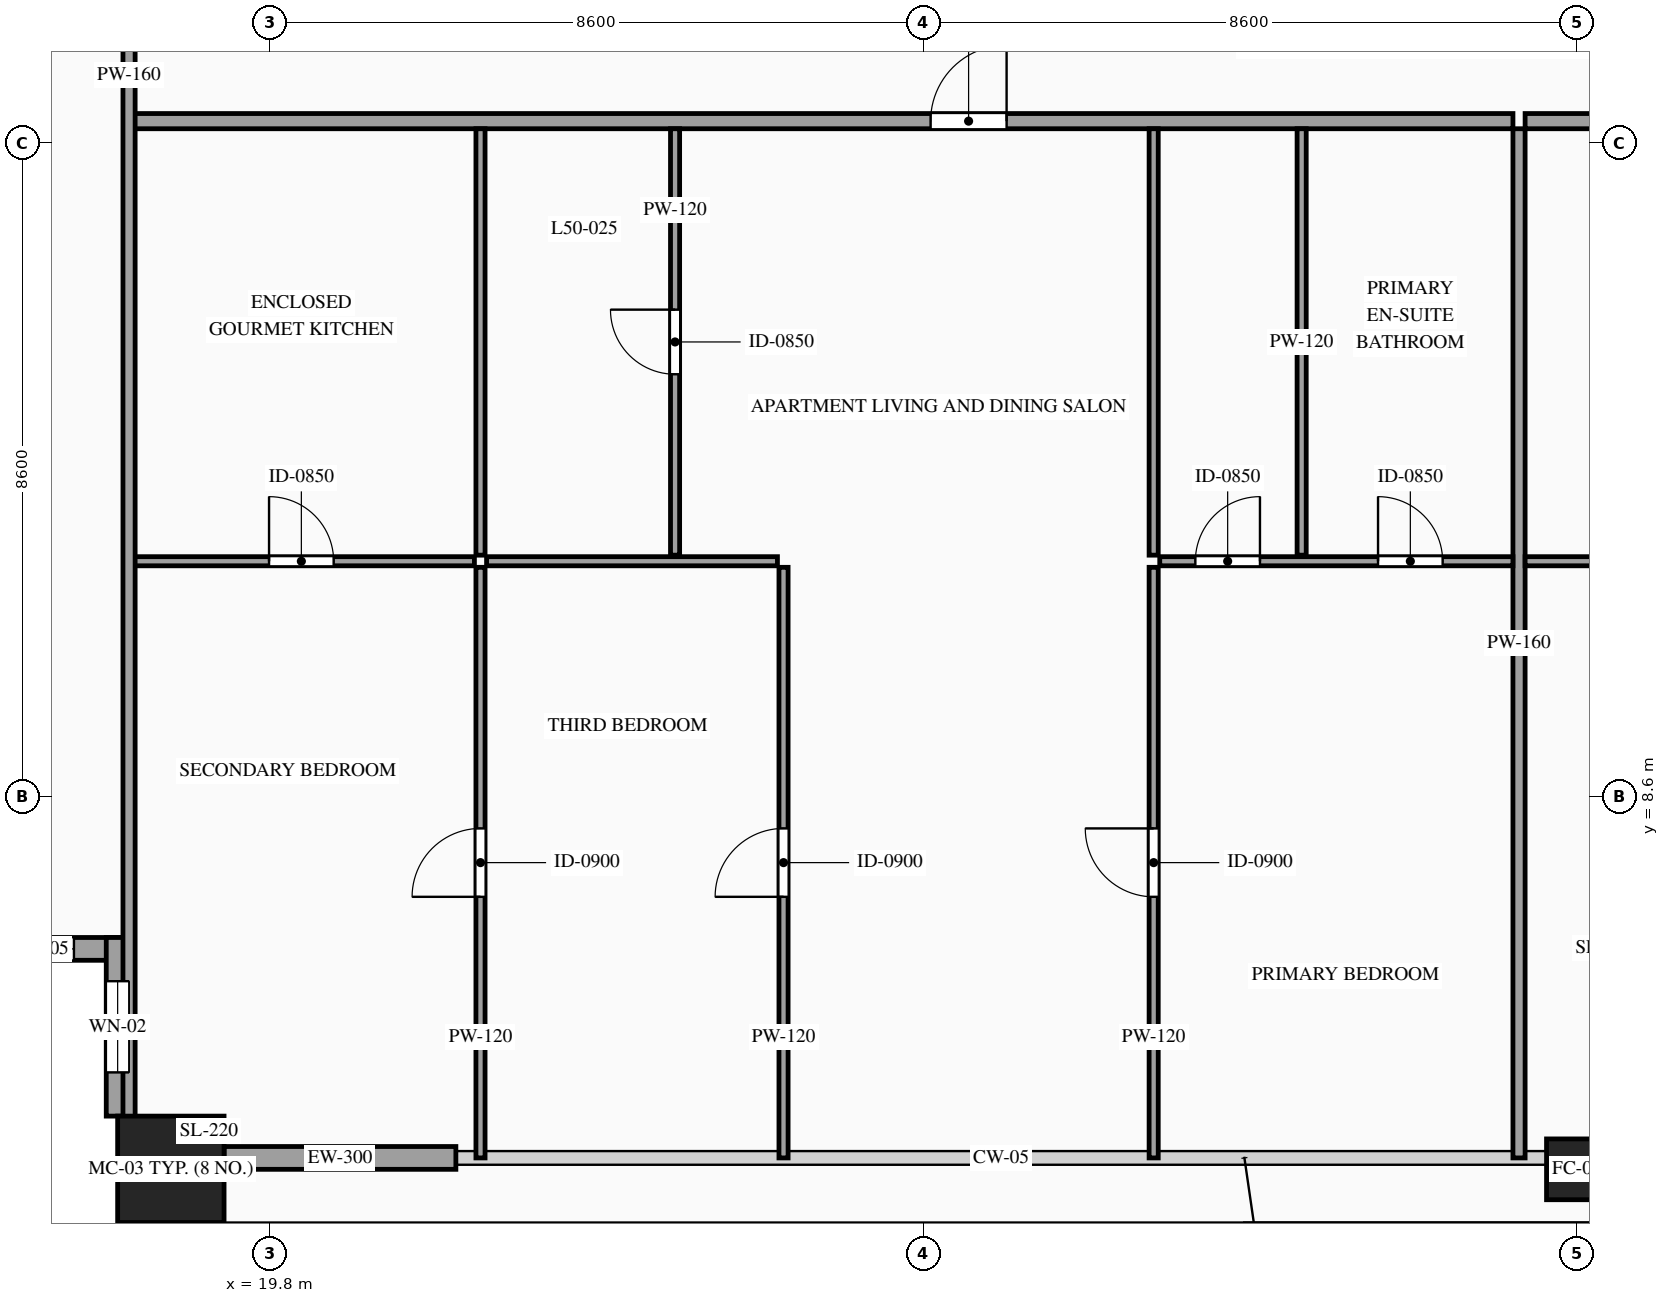
"""IFC4 building model, lengths in metres.
Left out: names, types, materials, properties, quantities, classifications, styles, units other than length and angle.
Written with IfcOpenShell. Run it as: python <this file> out.ifc"""

import sys

from ifc_helpers import new_model, si_unit, direction, frame, frame_2d, origin, origin_2d, place, context, subcontext, project, spatial, rectangle, hollow_rectangle, extrude, source, transform, mapped, element, fill, save


model = new_model("IFC4")
c1 = context("Model", 3, precision=1e-05, world=origin(), true_north=direction((0.0, 1.0)))
c2 = subcontext(c1, "Body", "Model", "MODEL_VIEW")
j1 = project(units=[si_unit("LENGTHUNIT", "METRE"), si_unit("PLANEANGLEUNIT", "RADIAN")], contexts=[c1])
p1 = place(None, origin())
s1 = spatial("IfcSite", under=j1, at=p1, CompositionType="ELEMENT")
p2 = place(p1, origin())
s2 = spatial("IfcBuilding", under=s1, at=p2, CompositionType="ELEMENT")
p3 = place(p2, frame((0.0, 0.0, 191.5)))
s3 = spatial("IfcBuildingStorey", under=s2, at=p3, CompositionType="ELEMENT", Elevation=191.5)
m1 = source(origin(), c2, "Body", "SweptSolid", [
    extrude(hollow_rectangle(XDim=1.4, YDim=1.4, WallThickness=0.06, at=origin_2d()), origin(), (0.0, 0.0, 1.0), 3.5),
])
p4 = place(p3, frame((18.5, 3.7, 0.0), z_axis=(0.0, 0.0, 1.0), x_axis=(1.0, 0.0, 0.0)))
e1 = element("IfcColumn", 1, at=p4, inside=s3, PredefinedType="COLUMN", context=c2, shape_type="MappedRepresentation", body=[
    mapped(m1, transform((0.0, 0.0, 0.0), scale=1.0)),
])
m2 = source(origin(), c2, "Body", "SweptSolid", [
    extrude(hollow_rectangle(XDim=0.8, YDim=0.8, WallThickness=0.036, at=origin_2d()), origin(), (0.0, 0.0, 1.0), 3.5),
])
p5 = place(p3, frame((37.0, 3.7, 0.0), z_axis=(0.0, 0.0, 1.0), x_axis=(1.0, 0.0, 0.0)))
e2 = element("IfcColumn", 2, at=p5, inside=s3, PredefinedType="COLUMN", context=c2, shape_type="MappedRepresentation", body=[
    mapped(m2, transform((0.0, 0.0, 0.0), scale=1.0)),
])
p6 = place(p3, frame((15.6, 6.6, 0.0), z_axis=(0.0, 0.0, 1.0), x_axis=(1.0, 0.0, 0.0)))
e3 = element("IfcWall", 3, at=p6, inside=s3, PredefinedType="SOLIDWALL", context=c2, shape_type="SweptSolid", body=[
    extrude(rectangle(XDim=2.35, YDim=0.3, at=frame_2d((1.175, 0.0))), origin(), (0.0, 0.0, 1.0), 3.28),
])
p7 = place(p6, frame((0.725, 0.0, 0.85)))
e4 = element("IfcOpeningElement", 4, at=p7, cuts=e3, PredefinedType="OPENING", context=c2, shape_type="SweptSolid", body=[
    extrude(rectangle(XDim=0.9, YDim=1.5, at=frame_2d((0.45, 0.75))), frame((0.0, 0.165, 0.0), z_axis=(0.0, -1.0, 0.0), x_axis=(1.0, 0.0, 0.0)), (0.0, 0.0, 1.0), 0.33),
])
p8 = place(p3, frame((17.8, 6.75, 0.0), z_axis=(0.0, 0.0, 1.0), x_axis=(0.0, -1.0, 0.0)))
e5 = element("IfcWall", 5, at=p8, inside=s3, PredefinedType="SOLIDWALL", context=c2, shape_type="SweptSolid", body=[
    extrude(rectangle(XDim=2.35, YDim=0.3, at=frame_2d((1.175, 0.0))), origin(), (0.0, 0.0, 1.0), 3.28),
])
p9 = place(p8, frame((0.575, 0.0, 0.85)))
e6 = element("IfcOpeningElement", 6, at=p9, cuts=e5, PredefinedType="OPENING", context=c2, shape_type="SweptSolid", body=[
    extrude(rectangle(XDim=1.2, YDim=2.1, at=frame_2d((0.6, 1.05))), frame((0.0, 0.165, 0.0), z_axis=(0.0, -1.0, 0.0), x_axis=(1.0, 0.0, 0.0)), (0.0, 0.0, 1.0), 0.33),
])
m3 = source(origin(), c2, "Body", "SweptSolid", [
    extrude(rectangle(XDim=3.05, YDim=0.3, at=frame_2d((1.525, 0.0))), origin(), (0.0, 0.0, 1.0), 2.835),
])
p10 = place(p3, frame((19.2, 3.85, 0.0), z_axis=(0.0, 0.0, 1.0), x_axis=(1.0, 0.0, 0.0)))
e7 = element("IfcWall", 7, at=p10, inside=s3, PredefinedType="SOLIDWALL", context=c2, shape_type="MappedRepresentation", body=[
    mapped(m3, transform((0.0, 0.0, 0.0), scale=1.0)),
])
p11 = place(p3, frame((17.94, 17.49, 0.0), z_axis=(0.0, 0.0, 1.0), x_axis=(1.0, 0.0, 0.0)))
e8 = element("IfcWall", 8, at=p11, inside=s3, PredefinedType="PARTITIONING", context=c2, shape_type="SweptSolid", body=[
    extrude(rectangle(XDim=18.218, YDim=0.2, at=frame_2d((9.109, 0.0))), origin(), (0.0, 0.0, 1.0), 3.28),
])
p12 = place(p11, frame((10.556, 0.0, 0.0)))
e9 = element("IfcOpeningElement", 9, at=p12, cuts=e8, PredefinedType="OPENING", context=c2, shape_type="SweptSolid", body=[
    extrude(rectangle(XDim=1.0, YDim=2.2, at=frame_2d((0.5, 1.1))), frame((0.0, 0.115, 0.0), z_axis=(0.0, -1.0, 0.0), x_axis=(1.0, 0.0, 0.0)), (0.0, 0.0, 1.0), 0.23),
])
m4 = source(origin(), c2, "Body", "SweptSolid", [
    extrude(rectangle(XDim=13.54, YDim=0.16, at=frame_2d((6.77, 0.0))), origin(), (0.0, 0.0, 1.0), 3.28),
])
p13 = place(p3, frame((36.238, 3.85, 0.0), z_axis=(0.0, 0.0, 1.0), x_axis=(0.0, 1.0, 0.0)))
e10 = element("IfcWall", 10, at=p13, inside=s3, PredefinedType="PARTITIONING", context=c2, shape_type="MappedRepresentation", body=[
    mapped(m4, transform((0.0, 0.0, 0.0), scale=1.0)),
])
p14 = place(p3, frame((17.94, 11.7, 0.0), z_axis=(0.0, 0.0, 1.0), x_axis=(1.0, 0.0, 0.0)))
e11 = element("IfcWall", 11, at=p14, inside=s3, PredefinedType="PARTITIONING", context=c2, shape_type="SweptSolid", body=[
    extrude(rectangle(XDim=4.554, YDim=0.12, at=frame_2d((2.277, 0.0))), origin(), (0.0, 0.0, 1.0), 3.28),
])
p15 = place(p14, frame((1.852, 0.0, 0.0)))
e12 = element("IfcOpeningElement", 12, at=p15, cuts=e11, PredefinedType="OPENING", context=c2, shape_type="SweptSolid", body=[
    extrude(rectangle(XDim=0.85, YDim=2.1, at=frame_2d((0.425, 1.05))), frame((0.0, 0.075, 0.0), z_axis=(0.0, -1.0, 0.0), x_axis=(1.0, 0.0, 0.0)), (0.0, 0.0, 1.0), 0.15),
])
m5 = source(origin(), c2, "Body", "SweptSolid", [
    extrude(rectangle(XDim=5.61, YDim=0.12, at=frame_2d((2.805, 0.0))), origin(), (0.0, 0.0, 1.0), 3.28),
])
p16 = place(p3, frame((22.574, 11.78, 0.0), z_axis=(0.0, 0.0, 1.0), x_axis=(0.0, 1.0, 0.0)))
e13 = element("IfcWall", 13, at=p16, inside=s3, PredefinedType="PARTITIONING", context=c2, shape_type="MappedRepresentation", body=[
    mapped(m5, transform((0.0, 0.0, 0.0), scale=1.0)),
])
p17 = place(p3, frame((25.134, 11.78, 0.0), z_axis=(0.0, 0.0, 1.0), x_axis=(0.0, 1.0, 0.0)))
e14 = element("IfcWall", 14, at=p17, inside=s3, PredefinedType="PARTITIONING", context=c2, shape_type="SweptSolid", body=[
    extrude(rectangle(XDim=5.61, YDim=0.12, at=frame_2d((2.805, 0.0))), origin(), (0.0, 0.0, 1.0), 3.28),
])
p18 = place(p17, frame((2.38, 0.0, 0.0)))
e15 = element("IfcOpeningElement", 15, at=p18, cuts=e14, PredefinedType="OPENING", context=c2, shape_type="SweptSolid", body=[
    extrude(rectangle(XDim=0.85, YDim=2.1, at=frame_2d((0.425, 1.05))), frame((0.0, 0.075, 0.0), z_axis=(0.0, -1.0, 0.0), x_axis=(1.0, 0.0, 0.0)), (0.0, 0.0, 1.0), 0.15),
])
for number, where, z_axis, x_axis in (
    (16, (33.378, 11.78, 0.0), (0.0, 0.0, 1.0), (0.0, 1.0, 0.0)),
    (17, (31.431, 11.78, 0.0), (0.0, 0.0, 1.0), (0.0, 1.0, 0.0)),
):
    element("IfcWall", number, at=place(p3, frame(where, z_axis=z_axis, x_axis=x_axis)), inside=s3, PredefinedType="PARTITIONING", context=c2, shape_type="MappedRepresentation", body=[
        mapped(m5, transform((0.0, 0.0, 0.0), scale=1.0)),
    ])
p19 = place(p3, frame((22.574, 3.85, 0.0), z_axis=(0.0, 0.0, 1.0), x_axis=(0.0, 1.0, 0.0)))
e18 = element("IfcWall", 18, at=p19, inside=s3, PredefinedType="PARTITIONING", context=c2, shape_type="SweptSolid", body=[
    extrude(rectangle(XDim=7.77, YDim=0.12, at=frame_2d((3.885, 0.0))), origin(), (0.0, 0.0, 1.0), 3.28),
])
p20 = place(p19, frame((3.435, 0.0, 0.0)))
e19 = element("IfcOpeningElement", 19, at=p20, cuts=e18, PredefinedType="OPENING", context=c2, shape_type="SweptSolid", body=[
    extrude(rectangle(XDim=0.9, YDim=2.15, at=frame_2d((0.45, 1.075))), frame((0.0, 0.075, 0.0), z_axis=(0.0, -1.0, 0.0), x_axis=(1.0, 0.0, 0.0)), (0.0, 0.0, 1.0), 0.15),
])
p21 = place(p3, frame((31.511, 11.7, 0.0), z_axis=(0.0, 0.0, 1.0), x_axis=(1.0, 0.0, 0.0)))
e20 = element("IfcWall", 20, at=p21, inside=s3, PredefinedType="PARTITIONING", context=c2, shape_type="SweptSolid", body=[
    extrude(rectangle(XDim=4.647, YDim=0.12, at=frame_2d((2.323, 0.0))), origin(), (0.0, 0.0, 1.0), 2.875),
])
p22 = place(p21, frame((2.872, 0.0, 0.0)))
e21 = element("IfcOpeningElement", 21, at=p22, cuts=e20, PredefinedType="OPENING", context=c2, shape_type="SweptSolid", body=[
    extrude(rectangle(XDim=0.85, YDim=2.1, at=frame_2d((0.425, 1.05))), frame((0.0, 0.075, 0.0), z_axis=(0.0, -1.0, 0.0), x_axis=(1.0, 0.0, 0.0)), (0.0, 0.0, 1.0), 0.15),
])
p23 = place(p21, frame((0.469, 0.0, 0.0)))
e22 = element("IfcOpeningElement", 22, at=p23, cuts=e20, PredefinedType="OPENING", context=c2, shape_type="SweptSolid", body=[
    extrude(rectangle(XDim=0.85, YDim=2.1, at=frame_2d((0.425, 1.05))), frame((0.0, 0.075, 0.0), z_axis=(0.0, -1.0, 0.0), x_axis=(1.0, 0.0, 0.0)), (0.0, 0.0, 1.0), 0.15),
])
p24 = place(p3, frame((31.431, 3.85, 0.0), z_axis=(0.0, 0.0, 1.0), x_axis=(0.0, 1.0, 0.0)))
e23 = element("IfcWall", 23, at=p24, inside=s3, PredefinedType="PARTITIONING", context=c2, shape_type="SweptSolid", body=[
    extrude(rectangle(XDim=7.77, YDim=0.12, at=frame_2d((3.885, 0.0))), origin(), (0.0, 0.0, 1.0), 3.28),
])
p25 = place(p24, frame((3.435, 0.0, 0.0)))
e24 = element("IfcOpeningElement", 24, at=p25, cuts=e23, PredefinedType="OPENING", context=c2, shape_type="SweptSolid", body=[
    extrude(rectangle(XDim=0.9, YDim=2.15, at=frame_2d((0.45, 1.075))), frame((0.0, 0.075, 0.0), z_axis=(0.0, -1.0, 0.0), x_axis=(1.0, 0.0, 0.0)), (0.0, 0.0, 1.0), 0.15),
])
m6 = source(origin(), c2, "Body", "SweptSolid", [
    extrude(rectangle(XDim=3.827, YDim=0.12, at=frame_2d((1.914, 0.0))), origin(), (0.0, 0.0, 1.0), 2.875),
])
p26 = place(p3, frame((22.654, 11.7, 0.0), z_axis=(0.0, 0.0, 1.0), x_axis=(1.0, 0.0, 0.0)))
e25 = element("IfcWall", 25, at=p26, inside=s3, PredefinedType="PARTITIONING", context=c2, shape_type="MappedRepresentation", body=[
    mapped(m6, transform((0.0, 0.0, 0.0), scale=1.0)),
])
p27 = place(p3, frame((26.561, 3.85, 0.0), z_axis=(0.0, 0.0, 1.0), x_axis=(0.0, 1.0, 0.0)))
e26 = element("IfcWall", 26, at=p27, inside=s3, PredefinedType="PARTITIONING", context=c2, shape_type="SweptSolid", body=[
    extrude(rectangle(XDim=7.77, YDim=0.12, at=frame_2d((3.885, 0.0))), origin(), (0.0, 0.0, 1.0), 3.28),
])
p28 = place(p27, frame((3.435, 0.0, 0.0)))
e27 = element("IfcOpeningElement", 27, at=p28, cuts=e26, PredefinedType="OPENING", context=c2, shape_type="SweptSolid", body=[
    extrude(rectangle(XDim=0.9, YDim=2.15, at=frame_2d((0.45, 1.075))), frame((0.0, 0.075, 0.0), z_axis=(0.0, -1.0, 0.0), x_axis=(1.0, 0.0, 0.0)), (0.0, 0.0, 1.0), 0.15),
])
p29 = place(p3, frame((36.318, 17.49, 0.0), z_axis=(0.0, 0.0, 1.0), x_axis=(1.0, 0.0, 0.0)))
e28 = element("IfcWall", 28, at=p29, inside=s3, PredefinedType="PARTITIONING", context=c2, shape_type="SweptSolid", body=[
    extrude(rectangle(XDim=19.742, YDim=0.2, at=frame_2d((9.871, 0.0))), origin(), (0.0, 0.0, 1.0), 3.28),
])
p30 = place(p29, frame((11.915, 0.0, 0.0)))
e29 = element("IfcOpeningElement", 29, at=p30, cuts=e28, PredefinedType="OPENING", context=c2, shape_type="SweptSolid", body=[
    extrude(rectangle(XDim=1.0, YDim=2.2, at=frame_2d((0.5, 1.1))), frame((0.0, 0.115, 0.0), z_axis=(0.0, -1.0, 0.0), x_axis=(1.0, 0.0, 0.0)), (0.0, 0.0, 1.0), 0.23),
])
p31 = place(p3, frame((36.318, 11.7, 0.0), z_axis=(0.0, 0.0, 1.0), x_axis=(1.0, 0.0, 0.0)))
e30 = element("IfcWall", 30, at=p31, inside=s3, PredefinedType="PARTITIONING", context=c2, shape_type="SweptSolid", body=[
    extrude(rectangle(XDim=4.647, YDim=0.12, at=frame_2d((2.323, 0.0))), origin(), (0.0, 0.0, 1.0), 2.875),
])
p32 = place(p31, frame((1.898, 0.0, 0.0)))
e31 = element("IfcOpeningElement", 31, at=p32, cuts=e30, PredefinedType="OPENING", context=c2, shape_type="SweptSolid", body=[
    extrude(rectangle(XDim=0.85, YDim=2.1, at=frame_2d((0.425, 1.05))), frame((0.0, 0.075, 0.0), z_axis=(0.0, -1.0, 0.0), x_axis=(1.0, 0.0, 0.0)), (0.0, 0.0, 1.0), 0.15),
])
m7 = source(origin(), c2, "Body", "SweptSolid", [
    extrude(rectangle(XDim=28.19, YDim=0.16, at=frame_2d((14.095, 0.0))), origin(), (0.0, 0.0, 1.0), 3.28),
])
p33 = place(p3, frame((17.95, 4.0, 0.0), z_axis=(0.0, 0.0, 1.0), x_axis=(0.0, 1.0, 0.0)))
e32 = element("IfcWall", 32, at=p33, inside=s3, PredefinedType="PARTITIONING", context=c2, shape_type="MappedRepresentation", body=[
    mapped(m7, transform((0.0, 0.0, 0.0), scale=1.0)),
])
m8 = source(origin(), c2, "Body", "SweptSolid", [
    extrude(rectangle(XDim=0.9, YDim=1.5, at=frame_2d((0.45, 0.75))), frame((0.0, 0.03, 0.0), z_axis=(0.0, -1.0, 0.0), x_axis=(1.0, 0.0, 0.0)), (0.0, 0.0, 1.0), 0.06),
])
p34 = place(p7, origin())
e33 = element("IfcWindow", 33, at=p34, inside=s3, PartitioningType="SINGLE_PANEL", PredefinedType="WINDOW", context=c2, shape_type="MappedRepresentation", body=[
    mapped(m8, transform((0.0, 0.0, 0.0), scale=1.0)),
])
fill(e4, e33)
m9 = source(origin(), c2, "Body", "SweptSolid", [
    extrude(rectangle(XDim=1.2, YDim=2.1, at=frame_2d((0.6, 1.05))), frame((0.0, 0.03, 0.0), z_axis=(0.0, -1.0, 0.0), x_axis=(1.0, 0.0, 0.0)), (0.0, 0.0, 1.0), 0.06),
])
p35 = place(p9, origin())
e34 = element("IfcWindow", 34, at=p35, inside=s3, PartitioningType="SINGLE_PANEL", PredefinedType="WINDOW", context=c2, shape_type="MappedRepresentation", body=[
    mapped(m9, transform((0.0, 0.0, 0.0), scale=1.0)),
])
fill(e6, e34)
m10 = source(origin(), c2, "Body", "SweptSolid", [
    extrude(rectangle(XDim=1.0, YDim=2.2, at=frame_2d((0.5, 1.1))), frame((0.0, 0.025, 0.0), z_axis=(0.0, -1.0, 0.0), x_axis=(1.0, 0.0, 0.0)), (0.0, 0.0, 1.0), 0.05),
])
p36 = place(p12, origin())
e35 = element("IfcDoor", 35, at=p36, inside=s3, OperationType="SINGLE_SWING_RIGHT", PredefinedType="DOOR", context=c2, shape_type="MappedRepresentation", body=[
    mapped(m10, transform((0.0, 0.0, 0.0), scale=1.0)),
])
fill(e9, e35)
m11 = source(origin(), c2, "Body", "SweptSolid", [
    extrude(rectangle(XDim=0.85, YDim=2.1, at=frame_2d((0.425, 1.05))), frame((0.0, 0.025, 0.0), z_axis=(0.0, -1.0, 0.0), x_axis=(1.0, 0.0, 0.0)), (0.0, 0.0, 1.0), 0.05),
])
p37 = place(p15, origin())
e36 = element("IfcDoor", 36, at=p37, inside=s3, OperationType="SINGLE_SWING_LEFT", PredefinedType="DOOR", context=c2, shape_type="MappedRepresentation", body=[
    mapped(m11, transform((0.0, 0.0, 0.0), scale=1.0)),
])
fill(e12, e36)
p38 = place(p18, origin())
e37 = element("IfcDoor", 37, at=p38, inside=s3, OperationType="SINGLE_SWING_RIGHT", PredefinedType="DOOR", context=c2, shape_type="MappedRepresentation", body=[
    mapped(m11, transform((0.0, 0.0, 0.0), scale=1.0)),
])
fill(e15, e37)
p39 = place(p22, origin())
e38 = element("IfcDoor", 38, at=p39, inside=s3, OperationType="SINGLE_SWING_LEFT", PredefinedType="DOOR", context=c2, shape_type="MappedRepresentation", body=[
    mapped(m11, transform((0.0, 0.0, 0.0), scale=1.0)),
])
fill(e21, e38)
p40 = place(p23, origin())
e39 = element("IfcDoor", 39, at=p40, inside=s3, OperationType="SINGLE_SWING_RIGHT", PredefinedType="DOOR", context=c2, shape_type="MappedRepresentation", body=[
    mapped(m11, transform((0.0, 0.0, 0.0), scale=1.0)),
])
fill(e22, e39)
m12 = source(origin(), c2, "Body", "SweptSolid", [
    extrude(rectangle(XDim=0.9, YDim=2.15, at=frame_2d((0.45, 1.075))), frame((0.0, 0.025, 0.0), z_axis=(0.0, -1.0, 0.0), x_axis=(1.0, 0.0, 0.0)), (0.0, 0.0, 1.0), 0.05),
])
p41 = place(p20, origin())
e40 = element("IfcDoor", 40, at=p41, inside=s3, OperationType="SINGLE_SWING_LEFT", PredefinedType="DOOR", context=c2, shape_type="MappedRepresentation", body=[
    mapped(m12, transform((0.0, 0.0, 0.0), scale=1.0)),
])
fill(e19, e40)
p42 = place(p25, origin())
e41 = element("IfcDoor", 41, at=p42, inside=s3, OperationType="SINGLE_SWING_RIGHT", PredefinedType="DOOR", context=c2, shape_type="MappedRepresentation", body=[
    mapped(m12, transform((0.0, 0.0, 0.0), scale=1.0)),
])
fill(e24, e41)
p43 = place(p28, origin())
e42 = element("IfcDoor", 42, at=p43, inside=s3, OperationType="SINGLE_SWING_LEFT", PredefinedType="DOOR", context=c2, shape_type="MappedRepresentation", body=[
    mapped(m12, transform((0.0, 0.0, 0.0), scale=1.0)),
])
fill(e27, e42)
save(model, sys.argv[1])
